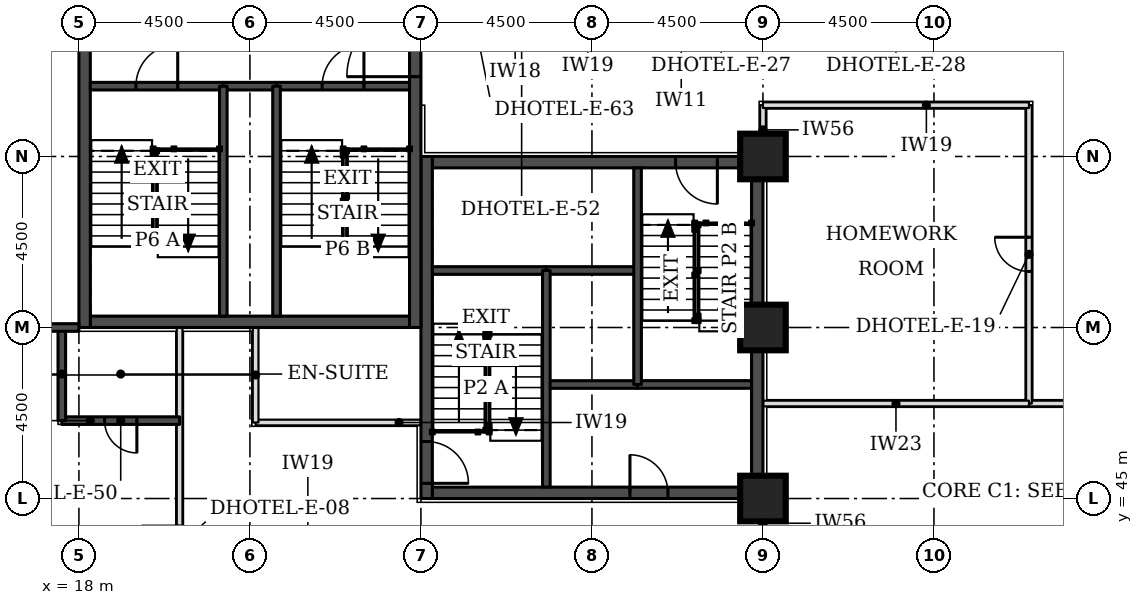
"""IFC4 building model, lengths in metres.
Left out: names, types, materials, properties, quantities, classifications, styles, units other than length and angle.
Written with IfcOpenShell. Run it as: python <this file> out.ifc"""

import sys

from ifc_helpers import new_model, si_unit, direction, frame, frame_2d, origin, origin_2d, place, context, subcontext, project, spatial, rectangle, extrude, element, fill, save


model = new_model("IFC4")
c1 = context("Model", 3, precision=1e-05, world=origin(), true_north=direction((0.0, 1.0)))
c2 = subcontext(c1, "Body", "Model", "MODEL_VIEW")
j1 = project(units=[si_unit("LENGTHUNIT", "METRE"), si_unit("PLANEANGLEUNIT", "RADIAN")], contexts=[c1])
p1 = place(None, origin())
s1 = spatial("IfcSite", under=j1, at=p1, CompositionType="ELEMENT")
p2 = place(p1, origin())
s2 = spatial("IfcBuilding", under=s1, at=p2, CompositionType="ELEMENT")
p3 = place(p2, frame((0.0, 0.0, 39.6)))
s3 = spatial("IfcBuildingStorey", under=s2, at=p3, CompositionType="ELEMENT", Elevation=39.6)
for number, where, z_axis, x_axis in (
    (1, (36.0, 45.0, 0.0), (0.0, 0.0, 1.0), (1.0, 0.0, 0.0)),
    (2, (36.0, 49.5, 0.0), (0.0, 0.0, 1.0), (1.0, 0.0, 0.0)),
    (3, (36.0, 54.0, 0.0), (0.0, 0.0, 1.0), (1.0, 0.0, 0.0)),
):
    element("IfcColumn", number, at=place(p3, frame(where, z_axis=z_axis, x_axis=x_axis)), inside=s3, PredefinedType="COLUMN", context=c2, shape_type="SweptSolid", body=[
        extrude(rectangle(XDim=1.2, YDim=1.2, at=origin_2d()), origin(), (0.0, 0.0, 1.0), 3.3),
    ])
p4 = place(p3, frame((27.3, 45.15, 0.0), z_axis=(0.0, 0.0, 1.0), x_axis=(1.0, 0.0, 0.0)))
e4 = element("IfcWall", 4, at=p4, inside=s3, PredefinedType="SHEAR", context=c2, shape_type="SweptSolid", body=[
    extrude(rectangle(XDim=8.4, YDim=0.3, at=frame_2d((4.2, 0.0))), origin(), (0.0, 0.0, 1.0), 3.3),
])
p5 = place(p4, frame((5.2, 0.0, 0.0)))
e5 = element("IfcOpeningElement", 5, at=p5, cuts=e4, PredefinedType="OPENING", context=c2, shape_type="SweptSolid", body=[
    extrude(rectangle(XDim=1.0, YDim=2.1, at=frame_2d((0.5, 1.05))), frame((0.0, 0.16, 0.0), z_axis=(0.0, -1.0, 0.0), x_axis=(1.0, 0.0, 0.0)), (0.0, 0.0, 1.0), 0.32),
])
p6 = place(p3, frame((27.3, 53.85, 0.0), z_axis=(0.0, 0.0, 1.0), x_axis=(1.0, 0.0, 0.0)))
e6 = element("IfcWall", 6, at=p6, inside=s3, PredefinedType="SHEAR", context=c2, shape_type="SweptSolid", body=[
    extrude(rectangle(XDim=8.4, YDim=0.3, at=frame_2d((4.2, 0.0))), origin(), (0.0, 0.0, 1.0), 3.3),
])
p7 = place(p6, frame((6.4, 0.0, 0.0)))
e7 = element("IfcOpeningElement", 7, at=p7, cuts=e6, PredefinedType="OPENING", context=c2, shape_type="SweptSolid", body=[
    extrude(rectangle(XDim=1.1, YDim=2.1, at=frame_2d((0.55, 1.05))), frame((0.0, 0.16, 0.0), z_axis=(0.0, -1.0, 0.0), x_axis=(1.0, 0.0, 0.0)), (0.0, 0.0, 1.0), 0.32),
])
p8 = place(p3, frame((27.15, 45.0, 0.0), z_axis=(0.0, 0.0, 1.0), x_axis=(0.0, 1.0, 0.0)))
e8 = element("IfcWall", 8, at=p8, inside=s3, PredefinedType="SHEAR", context=c2, shape_type="SweptSolid", body=[
    extrude(rectangle(XDim=9.0, YDim=0.3, at=frame_2d((4.5, 0.0))), origin(), (0.0, 0.0, 1.0), 3.3),
])
p9 = place(p8, frame((0.4, 0.0, 0.0)))
e9 = element("IfcOpeningElement", 9, at=p9, cuts=e8, PredefinedType="OPENING", context=c2, shape_type="SweptSolid", body=[
    extrude(rectangle(XDim=1.1, YDim=2.1, at=frame_2d((0.55, 1.05))), frame((0.0, 0.16, 0.0), z_axis=(0.0, -1.0, 0.0), x_axis=(1.0, 0.0, 0.0)), (0.0, 0.0, 1.0), 0.32),
])
p10 = place(p3, frame((35.85, 45.0, 0.0), z_axis=(0.0, 0.0, 1.0), x_axis=(0.0, 1.0, 0.0)))
e10 = element("IfcWall", 10, at=p10, inside=s3, PredefinedType="SHEAR", context=c2, shape_type="SweptSolid", body=[
    extrude(rectangle(XDim=9.0, YDim=0.3, at=frame_2d((4.5, 0.0))), origin(), (0.0, 0.0, 1.0), 3.3),
])
p11 = place(p3, frame((18.3, 49.65, 0.0), z_axis=(0.0, 0.0, 1.0), x_axis=(1.0, 0.0, 0.0)))
e11 = element("IfcWall", 11, at=p11, inside=s3, PredefinedType="SHEAR", context=c2, shape_type="SweptSolid", body=[
    extrude(rectangle(XDim=8.4, YDim=0.3, at=frame_2d((4.2, 0.0))), origin(), (0.0, 0.0, 1.0), 3.3),
])
p12 = place(p3, frame((18.15, 49.5, 0.0), z_axis=(0.0, 0.0, 1.0), x_axis=(0.0, 1.0, 0.0)))
e12 = element("IfcWall", 12, at=p12, inside=s3, PredefinedType="SHEAR", context=c2, shape_type="SweptSolid", body=[
    extrude(rectangle(XDim=9.0, YDim=0.3, at=frame_2d((4.5, 0.0))), origin(), (0.0, 0.0, 1.0), 3.3),
])
p13 = place(p3, frame((26.85, 49.5, 0.0), z_axis=(0.0, 0.0, 1.0), x_axis=(0.0, 1.0, 0.0)))
e13 = element("IfcWall", 13, at=p13, inside=s3, PredefinedType="SHEAR", context=c2, shape_type="SweptSolid", body=[
    extrude(rectangle(XDim=9.0, YDim=0.3, at=frame_2d((4.5, 0.0))), origin(), (0.0, 0.0, 1.0), 3.3),
])
p14 = place(p13, frame((6.6, 0.0, 0.0)))
e14 = element("IfcOpeningElement", 14, at=p14, cuts=e13, PredefinedType="OPENING", context=c2, shape_type="SweptSolid", body=[
    extrude(rectangle(XDim=1.8, YDim=2.1, at=frame_2d((0.9, 1.05))), frame((0.0, 0.16, 0.0), z_axis=(0.0, -1.0, 0.0), x_axis=(1.0, 0.0, 0.0)), (0.0, 0.0, 1.0), 0.32),
])
p15 = place(p3, frame((20.65, 25.15, 0.0), z_axis=(0.0, 0.0, 1.0), x_axis=(0.0, 1.0, 0.0)))
e15 = element("IfcWall", 15, at=p15, inside=s3, PredefinedType="PARTITIONING", context=c2, shape_type="SweptSolid", body=[
    extrude(rectangle(XDim=24.35, YDim=0.15, at=frame_2d((12.175, 0.0))), origin(), (0.0, 0.0, 1.0), 3.08),
])
p16 = place(p15, frame((0.447, 0.0, 0.0)))
e16 = element("IfcOpeningElement", 16, at=p16, cuts=e15, PredefinedType="OPENING", context=c2, shape_type="SweptSolid", body=[
    extrude(rectangle(XDim=1.0, YDim=2.1, at=frame_2d((0.5, 1.05))), frame((0.0, 0.085, 0.0), z_axis=(0.0, -1.0, 0.0), x_axis=(1.0, 0.0, 0.0)), (0.0, 0.0, 1.0), 0.17),
])
p17 = place(p15, frame((11.825, 0.0, 0.0)))
e17 = element("IfcOpeningElement", 17, at=p17, cuts=e15, PredefinedType="OPENING", context=c2, shape_type="SweptSolid", body=[
    extrude(rectangle(XDim=1.0, YDim=2.1, at=frame_2d((0.5, 1.05))), frame((0.0, 0.085, 0.0), z_axis=(0.0, -1.0, 0.0), x_axis=(1.0, 0.0, 0.0)), (0.0, 0.0, 1.0), 0.17),
])
p18 = place(p15, frame((18.125, 0.0, 0.0)))
e18 = element("IfcOpeningElement", 18, at=p18, cuts=e15, PredefinedType="OPENING", context=c2, shape_type="SweptSolid", body=[
    extrude(rectangle(XDim=1.0, YDim=2.1, at=frame_2d((0.5, 1.05))), frame((0.0, 0.085, 0.0), z_axis=(0.0, -1.0, 0.0), x_axis=(1.0, 0.0, 0.0)), (0.0, 0.0, 1.0), 0.17),
])
p19 = place(p3, frame((36.0, 40.55, 0.0), z_axis=(0.0, 0.0, 1.0), x_axis=(0.0, 1.0, 0.0)))
e19 = element("IfcWall", 19, at=p19, inside=s3, PredefinedType="PARTITIONING", context=c2, shape_type="SweptSolid", body=[
    extrude(rectangle(XDim=4.4, YDim=0.15, at=frame_2d((2.2, 0.0))), origin(), (0.0, 0.0, 1.0), 2.33),
])
p20 = place(p3, frame((22.65, 47.0, 0.0), z_axis=(0.0, 0.0, 1.0), x_axis=(1.0, 0.0, 0.0)))
e20 = element("IfcWall", 20, at=p20, inside=s3, PredefinedType="PARTITIONING", context=c2, shape_type="SweptSolid", body=[
    extrude(rectangle(XDim=4.35, YDim=0.15, at=frame_2d((2.175, 0.0))), origin(), (0.0, 0.0, 1.0), 3.08),
])
p21 = place(p3, frame((22.65, 47.0, 0.0), z_axis=(0.0, 0.0, 1.0), x_axis=(0.0, 1.0, 0.0)))
e21 = element("IfcWall", 21, at=p21, inside=s3, PredefinedType="PARTITIONING", context=c2, shape_type="SweptSolid", body=[
    extrude(rectangle(XDim=2.5, YDim=0.15, at=frame_2d((1.25, 0.0))), origin(), (0.0, 0.0, 1.0), 3.08),
])
p22 = place(p3, frame((43.0, 47.5, 0.0), z_axis=(0.0, 0.0, 1.0), x_axis=(1.0, 0.0, 0.0)))
e22 = element("IfcWall", 22, at=p22, inside=s3, PredefinedType="PARTITIONING", context=c2, shape_type="SweptSolid", body=[
    extrude(rectangle(XDim=4.0, YDim=0.15, at=frame_2d((2.0, 0.0))), origin(), (0.0, 0.0, 1.0), 3.08),
])
p23 = place(p3, frame((43.0, 47.5, 0.0), z_axis=(0.0, 0.0, 1.0), x_axis=(0.0, 1.0, 0.0)))
e23 = element("IfcWall", 23, at=p23, inside=s3, PredefinedType="PARTITIONING", context=c2, shape_type="SweptSolid", body=[
    extrude(rectangle(XDim=7.85, YDim=0.15, at=frame_2d((3.925, 0.0))), origin(), (0.0, 0.0, 1.0), 3.08),
])
p24 = place(p23, frame((3.475, 0.0, 0.0)))
e24 = element("IfcOpeningElement", 24, at=p24, cuts=e23, PredefinedType="OPENING", context=c2, shape_type="SweptSolid", body=[
    extrude(rectangle(XDim=0.9, YDim=2.1, at=frame_2d((0.45, 1.05))), frame((0.0, 0.085, 0.0), z_axis=(0.0, -1.0, 0.0), x_axis=(1.0, 0.0, 0.0)), (0.0, 0.0, 1.0), 0.17),
])
p25 = place(p3, frame((36.0, 54.05, 0.0), z_axis=(0.0, 0.0, 1.0), x_axis=(0.0, 1.0, 0.0)))
e25 = element("IfcWall", 25, at=p25, inside=s3, PredefinedType="PARTITIONING", context=c2, shape_type="SweptSolid", body=[
    extrude(rectangle(XDim=1.3, YDim=0.15, at=frame_2d((0.65, 0.0))), origin(), (0.0, 0.0, 1.0), 2.33),
])
p26 = place(p3, frame((36.0, 55.35, 0.0), z_axis=(0.0, 0.0, 1.0), x_axis=(1.0, 0.0, 0.0)))
e26 = element("IfcWall", 26, at=p26, inside=s3, PredefinedType="PARTITIONING", context=c2, shape_type="SweptSolid", body=[
    extrude(rectangle(XDim=7.0, YDim=0.15, at=frame_2d((3.5, 0.0))), origin(), (0.0, 0.0, 1.0), 3.08),
])
p27 = place(p3, frame((17.55, 47.05, 0.0), z_axis=(0.0, 0.0, 1.0), x_axis=(1.0, 0.0, 0.0)))
e27 = element("IfcWall", 27, at=p27, inside=s3, PredefinedType="SOLIDWALL", context=c2, shape_type="SweptSolid", body=[
    extrude(rectangle(XDim=3.1, YDim=0.2, at=frame_2d((1.55, 0.0))), origin(), (0.0, 0.0, 1.0), 3.08),
])
p28 = place(p27, frame((1.125, 0.0, 0.0)))
e28 = element("IfcOpeningElement", 28, at=p28, cuts=e27, PredefinedType="OPENING", context=c2, shape_type="SweptSolid", body=[
    extrude(rectangle(XDim=0.85, YDim=2.1, at=frame_2d((0.425, 1.05))), frame((0.0, 0.11, 0.0), z_axis=(0.0, -1.0, 0.0), x_axis=(1.0, 0.0, 0.0)), (0.0, 0.0, 1.0), 0.22),
])
p29 = place(p3, frame((17.55, 47.05, 0.0), z_axis=(0.0, 0.0, 1.0), x_axis=(0.0, 1.0, 0.0)))
e29 = element("IfcWall", 29, at=p29, inside=s3, PredefinedType="SOLIDWALL", context=c2, shape_type="SweptSolid", body=[
    extrude(rectangle(XDim=2.45, YDim=0.2, at=frame_2d((1.225, 0.0))), origin(), (0.0, 0.0, 1.0), 3.08),
])
p30 = place(p3, frame((14.1, 49.5, 0.0), z_axis=(0.0, 0.0, 1.0), x_axis=(1.0, 0.0, 0.0)))
e30 = element("IfcWall", 30, at=p30, inside=s3, PredefinedType="SOLIDWALL", context=c2, shape_type="SweptSolid", body=[
    extrude(rectangle(XDim=3.9, YDim=0.2, at=frame_2d((1.95, 0.0))), origin(), (0.0, 0.0, 1.0), 3.08),
])
p31 = place(p3, frame((36.0, 47.5, 0.0), z_axis=(0.0, 0.0, 1.0), x_axis=(1.0, 0.0, 0.0)))
e31 = element("IfcWall", 31, at=p31, inside=s3, PredefinedType="PARTITIONING", context=c2, shape_type="SweptSolid", body=[
    extrude(rectangle(XDim=7.0, YDim=0.15, at=frame_2d((3.5, 0.0))), origin(), (0.0, 0.0, 1.0), 3.08),
])
p32 = place(p3, frame((30.3, 48.0, 0.0), z_axis=(0.0, 0.0, 1.0), x_axis=(1.0, 0.0, 0.0)))
e32 = element("IfcWall", 32, at=p32, inside=s3, PredefinedType="SOLIDWALL", context=c2, shape_type="SweptSolid", body=[
    extrude(rectangle(XDim=2.4, YDim=0.2, at=frame_2d((1.2, 0.0))), origin(), (0.0, 0.0, 1.0), 3.08),
])
p33 = place(p3, frame((32.7, 48.0, 0.0), z_axis=(0.0, 0.0, 1.0), x_axis=(1.0, 0.0, 0.0)))
e33 = element("IfcWall", 33, at=p33, inside=s3, PredefinedType="SOLIDWALL", context=c2, shape_type="SweptSolid", body=[
    extrude(rectangle(XDim=3.0, YDim=0.2, at=frame_2d((1.5, 0.0))), origin(), (0.0, 0.0, 1.0), 3.08),
])
p34 = place(p3, frame((30.3, 51.0, 0.0), z_axis=(0.0, 0.0, 1.0), x_axis=(1.0, 0.0, 0.0)))
e34 = element("IfcWall", 34, at=p34, inside=s3, PredefinedType="SOLIDWALL", context=c2, shape_type="SweptSolid", body=[
    extrude(rectangle(XDim=2.4, YDim=0.2, at=frame_2d((1.2, 0.0))), origin(), (0.0, 0.0, 1.0), 3.3),
])
p35 = place(p3, frame((27.3, 51.0, 0.0), z_axis=(0.0, 0.0, 1.0), x_axis=(1.0, 0.0, 0.0)))
e35 = element("IfcWall", 35, at=p35, inside=s3, PredefinedType="SOLIDWALL", context=c2, shape_type="SweptSolid", body=[
    extrude(rectangle(XDim=3.0, YDim=0.2, at=frame_2d((1.5, 0.0))), origin(), (0.0, 0.0, 1.0), 3.08),
])
for number, where, z_axis, x_axis in (
    (36, (30.3, 45.3, 0.0), (0.0, 0.0, 1.0), (0.0, 1.0, 0.0)),
    (37, (32.7, 48.0, 0.0), (0.0, 0.0, 1.0), (0.0, 1.0, 0.0)),
):
    element("IfcWall", number, at=place(p3, frame(where, z_axis=z_axis, x_axis=x_axis)), inside=s3, PredefinedType="SOLIDWALL", context=c2, shape_type="SweptSolid", body=[
        extrude(rectangle(XDim=5.7, YDim=0.2, at=frame_2d((2.85, 0.0))), origin(), (0.0, 0.0, 1.0), 3.08),
    ])
p36 = place(p3, frame((21.8, 55.85, 0.0), z_axis=(0.0, 0.0, 1.0), x_axis=(1.0, 0.0, 0.0)))
e38 = element("IfcWall", 38, at=p36, inside=s3, PredefinedType="SOLIDWALL", context=c2, shape_type="SweptSolid", body=[
    extrude(rectangle(XDim=1.4, YDim=0.2, at=frame_2d((0.7, 0.0))), origin(), (0.0, 0.0, 1.0), 3.08),
])
p37 = place(p3, frame((18.3, 55.85, 0.0), z_axis=(0.0, 0.0, 1.0), x_axis=(1.0, 0.0, 0.0)))
e39 = element("IfcWall", 39, at=p37, inside=s3, PredefinedType="SOLIDWALL", context=c2, shape_type="SweptSolid", body=[
    extrude(rectangle(XDim=3.5, YDim=0.2, at=frame_2d((1.75, 0.0))), origin(), (0.0, 0.0, 1.0), 3.08),
])
p38 = place(p37, frame((1.2, 0.0, 0.0)))
e40 = element("IfcOpeningElement", 40, at=p38, cuts=e39, PredefinedType="OPENING", context=c2, shape_type="SweptSolid", body=[
    extrude(rectangle(XDim=1.1, YDim=2.1, at=frame_2d((0.55, 1.05))), frame((0.0, 0.11, 0.0), z_axis=(0.0, -1.0, 0.0), x_axis=(1.0, 0.0, 0.0)), (0.0, 0.0, 1.0), 0.22),
])
p39 = place(p3, frame((23.2, 55.85, 0.0), z_axis=(0.0, 0.0, 1.0), x_axis=(1.0, 0.0, 0.0)))
e41 = element("IfcWall", 41, at=p39, inside=s3, PredefinedType="SOLIDWALL", context=c2, shape_type="SweptSolid", body=[
    extrude(rectangle(XDim=3.5, YDim=0.2, at=frame_2d((1.75, 0.0))), origin(), (0.0, 0.0, 1.0), 3.08),
])
p40 = place(p39, frame((1.2, 0.0, 0.0)))
e42 = element("IfcOpeningElement", 42, at=p40, cuts=e41, PredefinedType="OPENING", context=c2, shape_type="SweptSolid", body=[
    extrude(rectangle(XDim=1.1, YDim=2.1, at=frame_2d((0.55, 1.05))), frame((0.0, 0.11, 0.0), z_axis=(0.0, -1.0, 0.0), x_axis=(1.0, 0.0, 0.0)), (0.0, 0.0, 1.0), 0.22),
])
for number, where, z_axis, x_axis in (
    (43, (21.8, 49.8, 0.0), (0.0, 0.0, 1.0), (0.0, 1.0, 0.0)),
    (44, (23.2, 49.8, 0.0), (0.0, 0.0, 1.0), (0.0, 1.0, 0.0)),
):
    element("IfcWall", number, at=place(p3, frame(where, z_axis=z_axis, x_axis=x_axis)), inside=s3, PredefinedType="SOLIDWALL", context=c2, shape_type="SweptSolid", body=[
        extrude(rectangle(XDim=6.05, YDim=0.2, at=frame_2d((3.025, 0.0))), origin(), (0.0, 0.0, 1.0), 3.08),
    ])
p41 = place(p28, frame((0.85, 0.0, 0.0), z_axis=(0.0, 0.0, 1.0), x_axis=(-1.0, 0.0, 0.0)))
e45 = element("IfcDoor", 45, at=p41, inside=s3, OperationType="SINGLE_SWING_LEFT", PredefinedType="DOOR", context=c2, shape_type="SweptSolid", body=[
    extrude(rectangle(XDim=0.85, YDim=2.1, at=frame_2d((0.425, 1.05))), frame((0.0, 0.025, 0.0), z_axis=(0.0, -1.0, 0.0), x_axis=(1.0, 0.0, 0.0)), (0.0, 0.0, 1.0), 0.05),
])
fill(e28, e45)
p42 = place(p24, origin())
e46 = element("IfcDoor", 46, at=p42, inside=s3, OperationType="SINGLE_SWING_RIGHT", PredefinedType="DOOR", context=c2, shape_type="SweptSolid", body=[
    extrude(rectangle(XDim=0.9, YDim=2.1, at=frame_2d((0.45, 1.05))), frame((0.0, 0.025, 0.0), z_axis=(0.0, -1.0, 0.0), x_axis=(1.0, 0.0, 0.0)), (0.0, 0.0, 1.0), 0.05),
])
fill(e24, e46)
p43 = place(p9, frame((1.1, 0.0, 0.0), z_axis=(0.0, 0.0, 1.0), x_axis=(-1.0, 0.0, 0.0)))
e47 = element("IfcDoor", 47, at=p43, inside=s3, OperationType="SINGLE_SWING_RIGHT", PredefinedType="DOOR", context=c2, shape_type="SweptSolid", body=[
    extrude(rectangle(XDim=1.1, YDim=2.1, at=frame_2d((0.55, 1.05))), frame((0.0, 0.025, 0.0), z_axis=(0.0, -1.0, 0.0), x_axis=(1.0, 0.0, 0.0)), (0.0, 0.0, 1.0), 0.05),
])
fill(e9, e47)
p44 = place(p7, frame((1.1, 0.0, 0.0), z_axis=(0.0, 0.0, 1.0), x_axis=(-1.0, 0.0, 0.0)))
e48 = element("IfcDoor", 48, at=p44, inside=s3, OperationType="SINGLE_SWING_LEFT", PredefinedType="DOOR", context=c2, shape_type="SweptSolid", body=[
    extrude(rectangle(XDim=1.1, YDim=2.1, at=frame_2d((0.55, 1.05))), frame((0.0, 0.025, 0.0), z_axis=(0.0, -1.0, 0.0), x_axis=(1.0, 0.0, 0.0)), (0.0, 0.0, 1.0), 0.05),
])
fill(e7, e48)
p45 = place(p5, origin())
e49 = element("IfcDoor", 49, at=p45, inside=s3, OperationType="SINGLE_SWING_LEFT", PredefinedType="DOOR", context=c2, shape_type="SweptSolid", body=[
    extrude(rectangle(XDim=1.0, YDim=2.1, at=frame_2d((0.5, 1.05))), frame((0.0, 0.025, 0.0), z_axis=(0.0, -1.0, 0.0), x_axis=(1.0, 0.0, 0.0)), (0.0, 0.0, 1.0), 0.05),
])
fill(e5, e49)
p46 = place(p38, origin())
e50 = element("IfcDoor", 50, at=p46, inside=s3, OperationType="SINGLE_SWING_RIGHT", PredefinedType="DOOR", context=c2, shape_type="SweptSolid", body=[
    extrude(rectangle(XDim=1.1, YDim=2.1, at=frame_2d((0.55, 1.05))), frame((0.0, 0.025, 0.0), z_axis=(0.0, -1.0, 0.0), x_axis=(1.0, 0.0, 0.0)), (0.0, 0.0, 1.0), 0.05),
])
fill(e40, e50)
p47 = place(p40, origin())
e51 = element("IfcDoor", 51, at=p47, inside=s3, OperationType="SINGLE_SWING_RIGHT", PredefinedType="DOOR", context=c2, shape_type="SweptSolid", body=[
    extrude(rectangle(XDim=1.1, YDim=2.1, at=frame_2d((0.55, 1.05))), frame((0.0, 0.025, 0.0), z_axis=(0.0, -1.0, 0.0), x_axis=(1.0, 0.0, 0.0)), (0.0, 0.0, 1.0), 0.05),
])
fill(e42, e51)
p48 = place(p14, origin())
e52 = element("IfcDoor", 52, at=p48, inside=s3, OperationType="SINGLE_SWING_LEFT", PredefinedType="DOOR", context=c2, shape_type="SweptSolid", body=[
    extrude(rectangle(XDim=1.8, YDim=2.1, at=frame_2d((0.9, 1.05))), frame((0.0, 0.025, 0.0), z_axis=(0.0, -1.0, 0.0), x_axis=(1.0, 0.0, 0.0)), (0.0, 0.0, 1.0), 0.05),
])
fill(e14, e52)
save(model, sys.argv[1])
